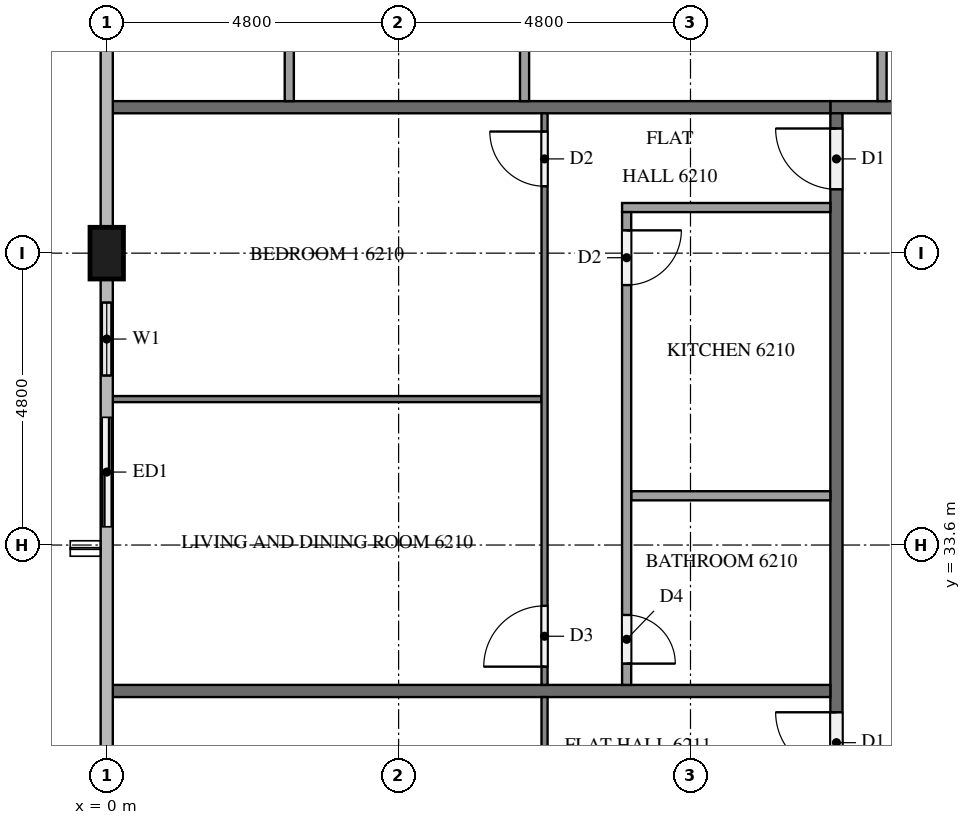
"""IFC4 building model, lengths in metres.
Left out: names, types, materials, properties, quantities, classifications, styles, units other than length and angle.
Written with IfcOpenShell. Run it as: python <this file> out.ifc"""

import sys

from ifc_helpers import new_model, si_unit, direction, frame, frame_2d, origin, origin_2d, place, context, subcontext, project, spatial, rectangle, extrude, element, fill, save


model = new_model("IFC4")
c1 = context("Model", 3, precision=1e-05, world=origin(), true_north=direction((0.0, 1.0)))
c2 = subcontext(c1, "Body", "Model", "MODEL_VIEW")
j1 = project(units=[si_unit("LENGTHUNIT", "METRE"), si_unit("PLANEANGLEUNIT", "RADIAN")], contexts=[c1])
p1 = place(None, origin())
s1 = spatial("IfcSite", under=j1, at=p1, CompositionType="ELEMENT")
p2 = place(p1, origin())
s2 = spatial("IfcBuilding", under=s1, at=p2, CompositionType="ELEMENT")
p3 = place(p2, frame((0.0, 0.0, 238.7)))
s3 = spatial("IfcBuildingStorey", under=s2, at=p3, CompositionType="ELEMENT", Elevation=238.7)
p4 = place(p3, frame((0.0, 38.4, 0.0), z_axis=(0.0, 0.0, 1.0), x_axis=(0.0, 1.0, 0.0)))
e1 = element("IfcColumn", 1, at=p4, inside=s3, PredefinedType="COLUMN", context=c2, shape_type="SweptSolid", body=[
    extrude(rectangle(XDim=0.85, YDim=0.55, at=origin_2d()), origin(), (0.0, 0.0, 1.0), 3.2),
])
p5 = place(p3, frame((0.0, 37.975, 0.0), z_axis=(0.0, 0.0, 1.0), x_axis=(0.0, -1.0, 0.0)))
e2 = element("IfcWall", 2, at=p5, inside=s3, PredefinedType="SOLIDWALL", context=c2, shape_type="SweptSolid", body=[
    extrude(rectangle(XDim=4.375, YDim=0.15, at=frame_2d((2.188, 0.0))), origin(), (0.0, 0.0, 1.0), 3.2),
])
p6 = place(p5, frame((0.387, 0.0, 0.9)))
e3 = element("IfcOpeningElement", 3, at=p6, cuts=e2, PredefinedType="OPENING", context=c2, shape_type="SweptSolid", body=[
    extrude(rectangle(XDim=1.2, YDim=1.4, at=frame_2d((0.6, 0.7))), frame((0.0, 0.085, 0.0), z_axis=(0.0, -1.0, 0.0), x_axis=(1.0, 0.0, 0.0)), (0.0, 0.0, 1.0), 0.17),
])
p7 = place(p5, frame((2.275, 0.0, 0.0)))
e4 = element("IfcOpeningElement", 4, at=p7, cuts=e2, PredefinedType="OPENING", context=c2, shape_type="SweptSolid", body=[
    extrude(rectangle(XDim=1.8, YDim=2.4, at=frame_2d((0.9, 1.2))), frame((0.0, 0.085, 0.0), z_axis=(0.0, -1.0, 0.0), x_axis=(1.0, 0.0, 0.0)), (0.0, 0.0, 1.0), 0.17),
])
p8 = place(p3, frame((11.9, 40.8, 0.0), z_axis=(0.0, 0.0, 1.0), x_axis=(1.0, 0.0, 0.0)))
e5 = element("IfcWall", 5, at=p8, inside=s3, PredefinedType="PARTITIONING", context=c2, shape_type="SweptSolid", body=[
    extrude(rectangle(XDim=38.6, YDim=0.2, at=frame_2d((19.3, 0.0))), origin(), (0.0, 0.0, 1.0), 3.2),
])
p9 = place(p8, frame((34.05, 0.0, 0.0)))
e6 = element("IfcOpeningElement", 6, at=p9, cuts=e5, PredefinedType="OPENING", context=c2, shape_type="SweptSolid", body=[
    extrude(rectangle(XDim=1.0, YDim=2.1, at=frame_2d((0.5, 1.05))), frame((0.0, 0.11, 0.0), z_axis=(0.0, -1.0, 0.0), x_axis=(1.0, 0.0, 0.0)), (0.0, 0.0, 1.0), 0.22),
])
p10 = place(p8, frame((32.3, 0.0, 0.0)))
e7 = element("IfcOpeningElement", 7, at=p10, cuts=e5, PredefinedType="OPENING", context=c2, shape_type="SweptSolid", body=[
    extrude(rectangle(XDim=1.1, YDim=2.1, at=frame_2d((0.55, 1.05))), frame((0.0, 0.11, 0.0), z_axis=(0.0, -1.0, 0.0), x_axis=(1.0, 0.0, 0.0)), (0.0, 0.0, 1.0), 0.22),
])
p11 = place(p8, frame((2.85, 0.0, 0.0)))
e8 = element("IfcOpeningElement", 8, at=p11, cuts=e5, PredefinedType="OPENING", context=c2, shape_type="SweptSolid", body=[
    extrude(rectangle(XDim=1.0, YDim=2.1, at=frame_2d((0.5, 1.05))), frame((0.0, 0.11, 0.0), z_axis=(0.0, -1.0, 0.0), x_axis=(1.0, 0.0, 0.0)), (0.0, 0.0, 1.0), 0.22),
])
p12 = place(p8, frame((1.15, 0.0, 0.0)))
e9 = element("IfcOpeningElement", 9, at=p12, cuts=e5, PredefinedType="OPENING", context=c2, shape_type="SweptSolid", body=[
    extrude(rectangle(XDim=1.0, YDim=2.1, at=frame_2d((0.5, 1.05))), frame((0.0, 0.11, 0.0), z_axis=(0.0, -1.0, 0.0), x_axis=(1.0, 0.0, 0.0)), (0.0, 0.0, 1.0), 0.22),
])
p13 = place(p3, frame((12.0, 12.1, 0.0), z_axis=(0.0, 0.0, 1.0), x_axis=(0.0, 1.0, 0.0)))
e10 = element("IfcWall", 10, at=p13, inside=s3, PredefinedType="PARTITIONING", context=c2, shape_type="SweptSolid", body=[
    extrude(rectangle(XDim=28.6, YDim=0.2, at=frame_2d((14.3, 0.0))), origin(), (0.0, 0.0, 1.0), 3.2),
])
p14 = place(p13, frame((27.35, 0.0, 0.0)))
e11 = element("IfcOpeningElement", 11, at=p14, cuts=e10, PredefinedType="OPENING", context=c2, shape_type="SweptSolid", body=[
    extrude(rectangle(XDim=1.0, YDim=2.1, at=frame_2d((0.5, 1.05))), frame((0.0, 0.11, 0.0), z_axis=(0.0, -1.0, 0.0), x_axis=(1.0, 0.0, 0.0)), (0.0, 0.0, 1.0), 0.22),
])
p15 = place(p13, frame((17.75, 0.0, 0.0)))
e12 = element("IfcOpeningElement", 12, at=p15, cuts=e10, PredefinedType="OPENING", context=c2, shape_type="SweptSolid", body=[
    extrude(rectangle(XDim=1.0, YDim=2.1, at=frame_2d((0.5, 1.05))), frame((0.0, 0.11, 0.0), z_axis=(0.0, -1.0, 0.0), x_axis=(1.0, 0.0, 0.0)), (0.0, 0.0, 1.0), 0.22),
])
p16 = place(p13, frame((3.35, 0.0, 0.0)))
e13 = element("IfcOpeningElement", 13, at=p16, cuts=e10, PredefinedType="OPENING", context=c2, shape_type="SweptSolid", body=[
    extrude(rectangle(XDim=1.0, YDim=2.1, at=frame_2d((0.5, 1.05))), frame((0.0, 0.11, 0.0), z_axis=(0.0, -1.0, 0.0), x_axis=(1.0, 0.0, 0.0)), (0.0, 0.0, 1.0), 0.22),
])
for number, where, z_axis, x_axis in (
    (14, (0.1, 40.8, 0.0), (0.0, 0.0, 1.0), (1.0, 0.0, 0.0)),
    (15, (0.1, 31.2, 0.0), (0.0, 0.0, 1.0), (1.0, 0.0, 0.0)),
):
    element("IfcWall", number, at=place(p3, frame(where, z_axis=z_axis, x_axis=x_axis)), inside=s3, PredefinedType="PARTITIONING", context=c2, shape_type="SweptSolid", body=[
        extrude(rectangle(XDim=11.8, YDim=0.2, at=frame_2d((5.9, 0.0))), origin(), (0.0, 0.0, 1.0), 3.2),
    ])
for number, where, z_axis, x_axis in (
    (16, (6.871, 40.9, 0.0), (0.0, 0.0, 1.0), (0.0, 1.0, 0.0)),
    (17, (3.002, 40.9, 0.0), (0.0, 0.0, 1.0), (0.0, 1.0, 0.0)),
):
    element("IfcWall", number, at=place(p3, frame(where, z_axis=z_axis, x_axis=x_axis)), inside=s3, PredefinedType="PARTITIONING", context=c2, shape_type="SweptSolid", body=[
        extrude(rectangle(XDim=3.575, YDim=0.15, at=frame_2d((1.788, 0.0))), origin(), (0.0, 0.0, 1.0), 3.2),
    ])
p17 = place(p3, frame((12.75, 40.9, 0.0), z_axis=(0.0, 0.0, 1.0), x_axis=(0.0, 1.0, 0.0)))
e18 = element("IfcWall", 18, at=p17, inside=s3, PredefinedType="PARTITIONING", context=c2, shape_type="SweptSolid", body=[
    extrude(rectangle(XDim=3.725, YDim=0.15, at=frame_2d((1.863, 0.0))), origin(), (0.0, 0.0, 1.0), 3.2),
])
p18 = place(p3, frame((7.15, 36.0, 0.0), z_axis=(0.0, 0.0, 1.0), x_axis=(-1.0, 0.0, 0.0)))
e19 = element("IfcWall", 19, at=p18, inside=s3, PredefinedType="PARTITIONING", context=c2, shape_type="SweptSolid", body=[
    extrude(rectangle(XDim=7.05, YDim=0.1, at=frame_2d((3.525, 0.0))), origin(), (0.0, 0.0, 1.0), 3.2),
])
p19 = place(p3, frame((7.2, 31.3, 0.0), z_axis=(0.0, 0.0, 1.0), x_axis=(0.0, 1.0, 0.0)))
e20 = element("IfcWall", 20, at=p19, inside=s3, PredefinedType="PARTITIONING", context=c2, shape_type="SweptSolid", body=[
    extrude(rectangle(XDim=9.4, YDim=0.1, at=frame_2d((4.7, 0.0))), origin(), (0.0, 0.0, 1.0), 3.2),
])
p20 = place(p19, frame((8.2, 0.0, 0.0)))
e21 = element("IfcOpeningElement", 21, at=p20, cuts=e20, PredefinedType="OPENING", context=c2, shape_type="SweptSolid", body=[
    extrude(rectangle(XDim=0.9, YDim=2.1, at=frame_2d((0.45, 1.05))), frame((0.0, 0.06, 0.0), z_axis=(0.0, -1.0, 0.0), x_axis=(1.0, 0.0, 0.0)), (0.0, 0.0, 1.0), 0.12),
])
p21 = place(p19, frame((0.3, 0.0, 0.0)))
e22 = element("IfcOpeningElement", 22, at=p21, cuts=e20, PredefinedType="OPENING", context=c2, shape_type="SweptSolid", body=[
    extrude(rectangle(XDim=1.0, YDim=2.1, at=frame_2d((0.5, 1.05))), frame((0.0, 0.06, 0.0), z_axis=(0.0, -1.0, 0.0), x_axis=(1.0, 0.0, 0.0)), (0.0, 0.0, 1.0), 0.12),
])
p22 = place(p3, frame((11.9, 34.41, 0.0), z_axis=(0.0, 0.0, 1.0), x_axis=(-1.0, 0.0, 0.0)))
e23 = element("IfcWall", 23, at=p22, inside=s3, PredefinedType="PARTITIONING", context=c2, shape_type="SweptSolid", body=[
    extrude(rectangle(XDim=3.275, YDim=0.15, at=frame_2d((1.637, 0.0))), origin(), (0.0, 0.0, 1.0), 3.2),
])
p23 = place(p3, frame((11.9, 39.15, 0.0), z_axis=(0.0, 0.0, 1.0), x_axis=(-1.0, 0.0, 0.0)))
e24 = element("IfcWall", 24, at=p23, inside=s3, PredefinedType="PARTITIONING", context=c2, shape_type="SweptSolid", body=[
    extrude(rectangle(XDim=3.425, YDim=0.15, at=frame_2d((1.712, 0.0))), origin(), (0.0, 0.0, 1.0), 3.2),
])
p24 = place(p3, frame((8.55, 39.075, 0.0), z_axis=(0.0, 0.0, 1.0), x_axis=(0.0, -1.0, 0.0)))
e25 = element("IfcWall", 25, at=p24, inside=s3, PredefinedType="PARTITIONING", context=c2, shape_type="SweptSolid", body=[
    extrude(rectangle(XDim=7.775, YDim=0.15, at=frame_2d((3.887, 0.0))), origin(), (0.0, 0.0, 1.0), 3.2),
])
p25 = place(p24, frame((0.3, 0.0, 0.0)))
e26 = element("IfcOpeningElement", 26, at=p25, cuts=e25, PredefinedType="OPENING", context=c2, shape_type="SweptSolid", body=[
    extrude(rectangle(XDim=0.9, YDim=2.1, at=frame_2d((0.45, 1.05))), frame((0.0, 0.085, 0.0), z_axis=(0.0, -1.0, 0.0), x_axis=(1.0, 0.0, 0.0)), (0.0, 0.0, 1.0), 0.17),
])
p26 = place(p24, frame((6.625, 0.0, 0.0)))
e27 = element("IfcOpeningElement", 27, at=p26, cuts=e25, PredefinedType="OPENING", context=c2, shape_type="SweptSolid", body=[
    extrude(rectangle(XDim=0.8, YDim=2.1, at=frame_2d((0.4, 1.05))), frame((0.0, 0.085, 0.0), z_axis=(0.0, -1.0, 0.0), x_axis=(1.0, 0.0, 0.0)), (0.0, 0.0, 1.0), 0.17),
])
p27 = place(p3, frame((7.2, 16.9, 0.0), z_axis=(0.0, 0.0, 1.0), x_axis=(0.0, 1.0, 0.0)))
e28 = element("IfcWall", 28, at=p27, inside=s3, PredefinedType="PARTITIONING", context=c2, shape_type="SweptSolid", body=[
    extrude(rectangle(XDim=14.2, YDim=0.1, at=frame_2d((7.1, 0.0))), origin(), (0.0, 0.0, 1.0), 3.2),
])
p28 = place(p27, frame((9.85, 0.0, 0.0)))
e29 = element("IfcOpeningElement", 29, at=p28, cuts=e28, PredefinedType="OPENING", context=c2, shape_type="SweptSolid", body=[
    extrude(rectangle(XDim=1.0, YDim=2.1, at=frame_2d((0.5, 1.05))), frame((0.0, 0.06, 0.0), z_axis=(0.0, -1.0, 0.0), x_axis=(1.0, 0.0, 0.0)), (0.0, 0.0, 1.0), 0.12),
])
p29 = place(p27, frame((8.25, 0.0, 0.0)))
e30 = element("IfcOpeningElement", 30, at=p29, cuts=e28, PredefinedType="OPENING", context=c2, shape_type="SweptSolid", body=[
    extrude(rectangle(XDim=0.9, YDim=2.1, at=frame_2d((0.45, 1.05))), frame((0.0, 0.06, 0.0), z_axis=(0.0, -1.0, 0.0), x_axis=(1.0, 0.0, 0.0)), (0.0, 0.0, 1.0), 0.12),
])
p30 = place(p27, frame((0.3, 0.0, 0.0)))
e31 = element("IfcOpeningElement", 31, at=p30, cuts=e28, PredefinedType="OPENING", context=c2, shape_type="SweptSolid", body=[
    extrude(rectangle(XDim=0.9, YDim=2.1, at=frame_2d((0.45, 1.05))), frame((0.0, 0.06, 0.0), z_axis=(0.0, -1.0, 0.0), x_axis=(1.0, 0.0, 0.0)), (0.0, 0.0, 1.0), 0.12),
])
p31 = place(p6, origin())
e32 = element("IfcWindow", 32, at=p31, inside=s3, PartitioningType="SINGLE_PANEL", PredefinedType="WINDOW", context=c2, shape_type="SweptSolid", body=[
    extrude(rectangle(XDim=1.2, YDim=1.4, at=frame_2d((0.6, 0.7))), frame((0.0, 0.03, 0.0), z_axis=(0.0, -1.0, 0.0), x_axis=(1.0, 0.0, 0.0)), (0.0, 0.0, 1.0), 0.06),
])
fill(e3, e32)
p32 = place(p7, origin())
e33 = element("IfcDoor", 33, at=p32, inside=s3, OperationType="SLIDING_TO_LEFT", PredefinedType="DOOR", context=c2, shape_type="SweptSolid", body=[
    extrude(rectangle(XDim=1.8, YDim=2.4, at=frame_2d((0.9, 1.2))), frame((0.0, 0.025, 0.0), z_axis=(0.0, -1.0, 0.0), x_axis=(1.0, 0.0, 0.0)), (0.0, 0.0, 1.0), 0.05),
])
fill(e4, e33)
p33 = place(p14, origin())
e34 = element("IfcDoor", 34, at=p33, inside=s3, OperationType="SINGLE_SWING_RIGHT", PredefinedType="DOOR", context=c2, shape_type="SweptSolid", body=[
    extrude(rectangle(XDim=1.0, YDim=2.1, at=frame_2d((0.5, 1.05))), frame((0.0, 0.025, 0.0), z_axis=(0.0, -1.0, 0.0), x_axis=(1.0, 0.0, 0.0)), (0.0, 0.0, 1.0), 0.05),
])
fill(e11, e34)
p34 = place(p15, origin())
e35 = element("IfcDoor", 35, at=p34, inside=s3, OperationType="SINGLE_SWING_RIGHT", PredefinedType="DOOR", context=c2, shape_type="SweptSolid", body=[
    extrude(rectangle(XDim=1.0, YDim=2.1, at=frame_2d((0.5, 1.05))), frame((0.0, 0.025, 0.0), z_axis=(0.0, -1.0, 0.0), x_axis=(1.0, 0.0, 0.0)), (0.0, 0.0, 1.0), 0.05),
])
fill(e12, e35)
p35 = place(p20, origin())
e36 = element("IfcDoor", 36, at=p35, inside=s3, OperationType="SINGLE_SWING_RIGHT", PredefinedType="DOOR", context=c2, shape_type="SweptSolid", body=[
    extrude(rectangle(XDim=0.9, YDim=2.1, at=frame_2d((0.45, 1.05))), frame((0.0, 0.025, 0.0), z_axis=(0.0, -1.0, 0.0), x_axis=(1.0, 0.0, 0.0)), (0.0, 0.0, 1.0), 0.05),
])
fill(e21, e36)
p36 = place(p21, origin())
e37 = element("IfcDoor", 37, at=p36, inside=s3, OperationType="SINGLE_SWING_LEFT", PredefinedType="DOOR", context=c2, shape_type="SweptSolid", body=[
    extrude(rectangle(XDim=1.0, YDim=2.1, at=frame_2d((0.5, 1.05))), frame((0.0, 0.025, 0.0), z_axis=(0.0, -1.0, 0.0), x_axis=(1.0, 0.0, 0.0)), (0.0, 0.0, 1.0), 0.05),
])
fill(e22, e37)
p37 = place(p25, origin())
e38 = element("IfcDoor", 38, at=p37, inside=s3, OperationType="SINGLE_SWING_LEFT", PredefinedType="DOOR", context=c2, shape_type="SweptSolid", body=[
    extrude(rectangle(XDim=0.9, YDim=2.1, at=frame_2d((0.45, 1.05))), frame((0.0, 0.025, 0.0), z_axis=(0.0, -1.0, 0.0), x_axis=(1.0, 0.0, 0.0)), (0.0, 0.0, 1.0), 0.05),
])
fill(e26, e38)
p38 = place(p26, origin())
e39 = element("IfcDoor", 39, at=p38, inside=s3, OperationType="SINGLE_SWING_RIGHT", PredefinedType="DOOR", context=c2, shape_type="SweptSolid", body=[
    extrude(rectangle(XDim=0.8, YDim=2.1, at=frame_2d((0.4, 1.05))), frame((0.0, 0.025, 0.0), z_axis=(0.0, -1.0, 0.0), x_axis=(1.0, 0.0, 0.0)), (0.0, 0.0, 1.0), 0.05),
])
fill(e27, e39)
save(model, sys.argv[1])
